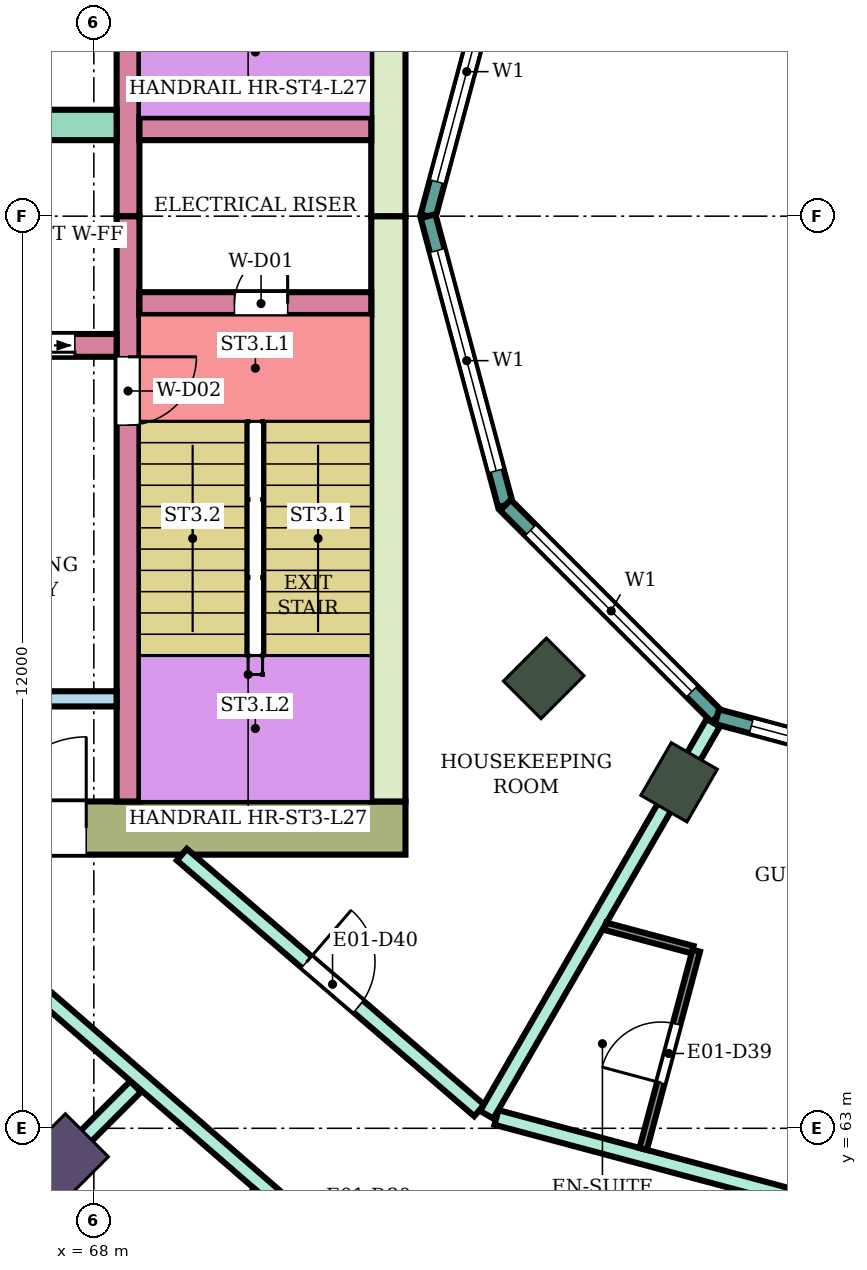
"""IFC4 building model, lengths in metres.
Left out: names, types, materials, properties, quantities, classifications, styles, units other than length and angle.
Written with IfcOpenShell. Run it as: python <this file> out.ifc"""

import sys

from ifc_helpers import new_model, si_unit, direction, frame, frame_2d, origin, origin_2d, place, context, subcontext, project, spatial, rectangle, extrude, element, fill, save


model = new_model("IFC4")
c1 = context("Model", 3, precision=1e-05, world=origin(), true_north=direction((0.0, 1.0)))
c2 = subcontext(c1, "Body", "Model", "MODEL_VIEW")
j1 = project(units=[si_unit("LENGTHUNIT", "METRE"), si_unit("PLANEANGLEUNIT", "RADIAN")], contexts=[c1])
p1 = place(None, origin())
s1 = spatial("IfcSite", under=j1, at=p1, CompositionType="ELEMENT")
p2 = place(p1, origin())
s2 = spatial("IfcBuilding", under=s1, at=p2, CompositionType="ELEMENT")
p3 = place(p2, frame((0.0, 0.0, 118.5)))
s3 = spatial("IfcBuildingStorey", under=s2, at=p3, CompositionType="ELEMENT", Elevation=118.5)
p4 = place(p3, frame((67.555, 62.555, 0.0), z_axis=(0.0, 0.0, 1.0), x_axis=(-0.707106781187, -0.707106781187, 0.0)))
e1 = element("IfcColumn", 1, at=p4, inside=s3, PredefinedType="COLUMN", context=c2, shape_type="SweptSolid", body=[
    extrude(rectangle(XDim=1.0, YDim=0.8, at=origin_2d()), origin(), (0.0, 0.0, 1.0), 3.9),
])
for number, where, z_axis, x_axis in (
    (2, (73.919, 68.919, 0.0), (0.0, 0.0, 1.0), (-0.707, -0.707, 0.0)),
    (3, (75.7, 67.552, 0.0), (0.0, 0.0, 1.0), (-0.5, -0.866, 0.0)),
):
    element("IfcColumn", number, at=place(p3, frame(where, z_axis=z_axis, x_axis=x_axis)), inside=s3, PredefinedType="COLUMN", context=c2, shape_type="SweptSolid", body=[
        extrude(rectangle(XDim=0.8, YDim=0.7, at=origin_2d()), origin(), (0.0, 0.0, 1.0), 3.9),
    ])
p5 = place(p3, frame((72.1, 66.95, 0.0), z_axis=(0.0, 0.0, 1.0), x_axis=(-1.0, 0.0, 0.0)))
e4 = element("IfcWall", 4, at=p5, inside=s3, PredefinedType="SHEAR", context=c2, shape_type="SweptSolid", body=[
    extrude(rectangle(XDim=14.8, YDim=0.7, at=frame_2d((7.4, 0.0))), origin(), (0.0, 0.0, 1.0), 3.58),
])
p6 = place(p5, frame((4.2, 0.0, 0.0)))
e5 = element("IfcOpeningElement", 5, at=p6, cuts=e4, PredefinedType="OPENING", context=c2, shape_type="SweptSolid", body=[
    extrude(rectangle(XDim=2.4, YDim=2.4, at=frame_2d((1.2, 1.2))), frame((0.0, 0.36, 0.0), z_axis=(0.0, -1.0, 0.0), x_axis=(1.0, 0.0, 0.0)), (0.0, 0.0, 1.0), 0.72),
])
for number, where, z_axis, x_axis in (
    (6, (71.875, 75.0, 0.0), (0.0, 0.0, 1.0), (0.0, -1.0, 0.0)),
    (7, (71.875, 82.7, 0.0), (0.0, 0.0, 1.0), (0.0, -1.0, 0.0)),
):
    element("IfcWall", number, at=place(p3, frame(where, z_axis=z_axis, x_axis=x_axis)), inside=s3, PredefinedType="SHEAR", context=c2, shape_type="SweptSolid", body=[
        extrude(rectangle(XDim=7.7, YDim=0.45, at=frame_2d((3.85, 0.0))), origin(), (0.0, 0.0, 1.0), 3.58),
    ])
p7 = place(p3, frame((68.45, 75.0, 0.0), z_axis=(0.0, 0.0, 1.0), x_axis=(0.0, -1.0, 0.0)))
e8 = element("IfcWall", 8, at=p7, inside=s3, PredefinedType="SHEAR", context=c2, shape_type="SweptSolid", body=[
    extrude(rectangle(XDim=7.7, YDim=0.3, at=frame_2d((3.85, 0.0))), origin(), (0.0, 0.0, 1.0), 3.58),
])
p8 = place(p7, frame((1.85, 0.0, 0.0)))
e9 = element("IfcOpeningElement", 9, at=p8, cuts=e8, PredefinedType="OPENING", context=c2, shape_type="SweptSolid", body=[
    extrude(rectangle(XDim=0.9, YDim=2.1, at=frame_2d((0.45, 1.05))), frame((0.0, 0.16, 0.0), z_axis=(0.0, -1.0, 0.0), x_axis=(1.0, 0.0, 0.0)), (0.0, 0.0, 1.0), 0.32),
])
p9 = place(p3, frame((68.45, 82.7, 0.0), z_axis=(0.0, 0.0, 1.0), x_axis=(0.0, -1.0, 0.0)))
e10 = element("IfcWall", 10, at=p9, inside=s3, PredefinedType="SHEAR", context=c2, shape_type="SweptSolid", body=[
    extrude(rectangle(XDim=7.7, YDim=0.3, at=frame_2d((3.85, 0.0))), origin(), (0.0, 0.0, 1.0), 3.58),
])
p10 = place(p9, frame((0.35, 0.0, 0.0)))
e11 = element("IfcOpeningElement", 11, at=p10, cuts=e10, PredefinedType="OPENING", context=c2, shape_type="SweptSolid", body=[
    extrude(rectangle(XDim=0.9, YDim=2.1, at=frame_2d((0.45, 1.05))), frame((0.0, 0.16, 0.0), z_axis=(0.0, -1.0, 0.0), x_axis=(1.0, 0.0, 0.0)), (0.0, 0.0, 1.0), 0.32),
])
p11 = place(p3, frame((71.65, 73.85, 0.0), z_axis=(0.0, 0.0, 1.0), x_axis=(-1.0, 0.0, 0.0)))
e12 = element("IfcWall", 12, at=p11, inside=s3, PredefinedType="SHEAR", context=c2, shape_type="SweptSolid", body=[
    extrude(rectangle(XDim=3.05, YDim=0.3, at=frame_2d((1.525, 0.0))), origin(), (0.0, 0.0, 1.0), 3.58),
])
p12 = place(p11, frame((1.1, 0.0, 0.0)))
e13 = element("IfcOpeningElement", 13, at=p12, cuts=e12, PredefinedType="OPENING", context=c2, shape_type="SweptSolid", body=[
    extrude(rectangle(XDim=0.7, YDim=2.0, at=frame_2d((0.35, 1.0))), frame((0.0, 0.16, 0.0), z_axis=(0.0, -1.0, 0.0), x_axis=(1.0, 0.0, 0.0)), (0.0, 0.0, 1.0), 0.32),
])
p13 = place(p3, frame((71.65, 76.15, 0.0), z_axis=(0.0, 0.0, 1.0), x_axis=(-1.0, 0.0, 0.0)))
e14 = element("IfcWall", 14, at=p13, inside=s3, PredefinedType="SHEAR", context=c2, shape_type="SweptSolid", body=[
    extrude(rectangle(XDim=3.05, YDim=0.3, at=frame_2d((1.525, 0.0))), origin(), (0.0, 0.0, 1.0), 3.58),
])
p14 = place(p3, frame((68.3, 73.3, 0.0), z_axis=(0.0, 0.0, 1.0), x_axis=(-1.0, 0.0, 0.0)))
e15 = element("IfcWall", 15, at=p14, inside=s3, PredefinedType="SHEAR", context=c2, shape_type="SweptSolid", body=[
    extrude(rectangle(XDim=11.0, YDim=0.3, at=frame_2d((5.5, 0.0))), origin(), (0.0, 0.0, 1.0), 3.58),
])
p15 = place(p14, frame((0.55, 0.0, 0.0)))
e16 = element("IfcOpeningElement", 16, at=p15, cuts=e15, PredefinedType="OPENING", context=c2, shape_type="SweptSolid", body=[
    extrude(rectangle(XDim=1.1, YDim=2.1, at=frame_2d((0.55, 1.05))), frame((0.0, 0.16, 0.0), z_axis=(0.0, -1.0, 0.0), x_axis=(1.0, 0.0, 0.0)), (0.0, 0.0, 1.0), 0.32),
])
p16 = place(p14, frame((8.1, 0.0, 0.0)))
e17 = element("IfcOpeningElement", 17, at=p16, cuts=e15, PredefinedType="OPENING", context=c2, shape_type="SweptSolid", body=[
    extrude(rectangle(XDim=1.0, YDim=2.1, at=frame_2d((0.5, 1.05))), frame((0.0, 0.16, 0.0), z_axis=(0.0, -1.0, 0.0), x_axis=(1.0, 0.0, 0.0)), (0.0, 0.0, 1.0), 0.32),
])
p17 = place(p3, frame((68.3, 76.2, 0.0), z_axis=(0.0, 0.0, 1.0), x_axis=(-1.0, 0.0, 0.0)))
e18 = element("IfcWall", 18, at=p17, inside=s3, PredefinedType="SHEAR", context=c2, shape_type="SweptSolid", body=[
    extrude(rectangle(XDim=11.0, YDim=0.4, at=frame_2d((5.5, 0.0))), origin(), (0.0, 0.0, 1.0), 3.58),
])
p18 = place(p3, frame((68.3, 68.65, 0.0), z_axis=(0.0, 0.0, 1.0), x_axis=(-1.0, 0.0, 0.0)))
e19 = element("IfcWall", 19, at=p18, inside=s3, PredefinedType="SHEAR", context=c2, shape_type="SweptSolid", body=[
    extrude(rectangle(XDim=4.5, YDim=0.2, at=frame_2d((2.25, 0.0))), origin(), (0.0, 0.0, 1.0), 3.58),
])
p19 = place(p3, frame((73.415, 78.802, 0.0), z_axis=(0.0, 0.0, 1.0), x_axis=(-0.258789828301, -0.965933654434, 0.0)))
e20 = element("IfcWall", 20, at=p19, inside=s3, PredefinedType="NOTDEFINED", context=c2, shape_type="SweptSolid", body=[
    extrude(rectangle(XDim=3.936, YDim=0.2, at=frame_2d((1.968, 0.0))), origin(), (0.0, 0.0, 1.0), 3.9),
])
p20 = place(p19, frame((0.468, 0.0, 0.9)))
e21 = element("IfcOpeningElement", 21, at=p20, cuts=e20, PredefinedType="OPENING", context=c2, shape_type="SweptSolid", body=[
    extrude(rectangle(XDim=3.0, YDim=2.3, at=frame_2d((1.5, 1.15))), frame((0.0, 0.11, 0.0), z_axis=(0.0, -1.0, 0.0), x_axis=(1.0, 0.0, 0.0)), (0.0, 0.0, 1.0), 0.22),
])
p21 = place(p3, frame((72.396, 75.0, 0.0), z_axis=(0.0, 0.0, 1.0), x_axis=(0.258789828301, -0.965933654434, 0.0)))
e22 = element("IfcWall", 22, at=p21, inside=s3, PredefinedType="NOTDEFINED", context=c2, shape_type="SweptSolid", body=[
    extrude(rectangle(XDim=3.936, YDim=0.2, at=frame_2d((1.968, 0.0))), origin(), (0.0, 0.0, 1.0), 3.9),
])
p22 = place(p21, frame((0.468, 0.0, 0.9)))
e23 = element("IfcOpeningElement", 23, at=p22, cuts=e22, PredefinedType="OPENING", context=c2, shape_type="SweptSolid", body=[
    extrude(rectangle(XDim=3.0, YDim=2.3, at=frame_2d((1.5, 1.15))), frame((0.0, 0.11, 0.0), z_axis=(0.0, -1.0, 0.0), x_axis=(1.0, 0.0, 0.0)), (0.0, 0.0, 1.0), 0.22),
])
p23 = place(p3, frame((73.415, 71.198, 0.0), z_axis=(0.0, 0.0, 1.0), x_axis=(0.707106781187, -0.707106781187, 0.0)))
e24 = element("IfcWall", 24, at=p23, inside=s3, PredefinedType="NOTDEFINED", context=c2, shape_type="SweptSolid", body=[
    extrude(rectangle(XDim=3.936, YDim=0.2, at=frame_2d((1.968, 0.0))), origin(), (0.0, 0.0, 1.0), 3.9),
])
p24 = place(p23, frame((0.468, 0.0, 0.9)))
e25 = element("IfcOpeningElement", 25, at=p24, cuts=e24, PredefinedType="OPENING", context=c2, shape_type="SweptSolid", body=[
    extrude(rectangle(XDim=3.0, YDim=2.3, at=frame_2d((1.5, 1.15))), frame((0.0, 0.11, 0.0), z_axis=(0.0, -1.0, 0.0), x_axis=(1.0, 0.0, 0.0)), (0.0, 0.0, 1.0), 0.22),
])
p25 = place(p3, frame((76.198, 68.415, 0.0), z_axis=(0.0, 0.0, 1.0), x_axis=(0.965933654434, -0.258789828301, 0.0)))
e26 = element("IfcWall", 26, at=p25, inside=s3, PredefinedType="NOTDEFINED", context=c2, shape_type="SweptSolid", body=[
    extrude(rectangle(XDim=3.936, YDim=0.2, at=frame_2d((1.968, 0.0))), origin(), (0.0, 0.0, 1.0), 3.9),
])
p26 = place(p25, frame((0.468, 0.0, 0.9)))
e27 = element("IfcOpeningElement", 27, at=p26, cuts=e26, PredefinedType="OPENING", context=c2, shape_type="SweptSolid", body=[
    extrude(rectangle(XDim=3.0, YDim=2.3, at=frame_2d((1.5, 1.15))), frame((0.0, 0.11, 0.0), z_axis=(0.0, -1.0, 0.0), x_axis=(1.0, 0.0, 0.0)), (0.0, 0.0, 1.0), 0.22),
])
p27 = place(p3, frame((63.596, 58.596, 0.0), z_axis=(0.0, 0.0, 1.0), x_axis=(0.707106781187, 0.707106781187, 0.0)))
e28 = element("IfcWall", 28, at=p27, inside=s3, PredefinedType="PARTITIONING", context=c2, shape_type="SweptSolid", body=[
    extrude(rectangle(XDim=7.005, YDim=0.2, at=frame_2d((3.503, 0.0))), origin(), (0.0, 0.0, 1.0), 3.45),
])
p28 = place(p3, frame((67.081, 64.971, 0.0), z_axis=(0.0, 0.0, 1.0), x_axis=(0.755031061605, -0.65568902386, 0.0)))
e29 = element("IfcWall", 29, at=p28, inside=s3, PredefinedType="PARTITIONING", context=c2, shape_type="SweptSolid", body=[
    extrude(rectangle(XDim=6.186, YDim=0.2, at=frame_2d((3.093, 0.0))), origin(), (0.0, 0.0, 1.0), 3.45),
])
p29 = place(p28, frame((4.755, 0.0, 0.0)))
e30 = element("IfcOpeningElement", 30, at=p29, cuts=e29, PredefinedType="OPENING", context=c2, shape_type="SweptSolid", body=[
    extrude(rectangle(XDim=1.0, YDim=2.1, at=frame_2d((0.5, 1.05))), frame((0.0, 0.11, 0.0), z_axis=(0.0, -1.0, 0.0), x_axis=(1.0, 0.0, 0.0)), (0.0, 0.0, 1.0), 0.22),
])
p30 = place(p3, frame((69.158, 66.6, 0.0), z_axis=(0.0, 0.0, 1.0), x_axis=(0.758063092745, -0.652181222835, 0.0)))
e31 = element("IfcWall", 31, at=p30, inside=s3, PredefinedType="PARTITIONING", context=c2, shape_type="SweptSolid", body=[
    extrude(rectangle(XDim=5.16, YDim=0.2, at=frame_2d((2.58, 0.0))), origin(), (0.0, 0.0, 1.0), 3.45),
])
p31 = place(p30, frame((2.165, 0.0, 0.0)))
e32 = element("IfcOpeningElement", 32, at=p31, cuts=e31, PredefinedType="OPENING", context=c2, shape_type="SweptSolid", body=[
    extrude(rectangle(XDim=0.9, YDim=2.1, at=frame_2d((0.45, 1.05))), frame((0.0, 0.11, 0.0), z_axis=(0.0, -1.0, 0.0), x_axis=(1.0, 0.0, 0.0)), (0.0, 0.0, 1.0), 0.22),
])
p32 = place(p3, frame((73.297, 63.143, 0.0), z_axis=(0.0, 0.0, 1.0), x_axis=(0.965859030528, -0.25906820173, 0.0)))
e33 = element("IfcWall", 33, at=p32, inside=s3, PredefinedType="PARTITIONING", context=c2, shape_type="SweptSolid", body=[
    extrude(rectangle(XDim=6.81, YDim=0.2, at=frame_2d((3.405, 0.0))), origin(), (0.0, 0.0, 1.0), 3.45),
])
p33 = place(p32, frame((5.39, 0.0, 0.0)))
e34 = element("IfcOpeningElement", 34, at=p33, cuts=e33, PredefinedType="OPENING", context=c2, shape_type="SweptSolid", body=[
    extrude(rectangle(XDim=1.0, YDim=2.1, at=frame_2d((0.5, 1.05))), frame((0.0, 0.11, 0.0), z_axis=(0.0, -1.0, 0.0), x_axis=(1.0, 0.0, 0.0)), (0.0, 0.0, 1.0), 0.22),
])
p34 = place(p3, frame((73.169, 63.178, 0.0), z_axis=(0.0, 0.0, 1.0), x_axis=(0.500239348149, 0.865887171959, 0.0)))
e35 = element("IfcWall", 35, at=p34, inside=s3, PredefinedType="PARTITIONING", context=c2, shape_type="SweptSolid", body=[
    extrude(rectangle(XDim=5.955, YDim=0.2, at=frame_2d((2.978, 0.0))), origin(), (0.0, 0.0, 1.0), 3.45),
])
p35 = place(p3, frame((65.209, 62.875, 0.0), z_axis=(0.0, 0.0, 1.0), x_axis=(0.757930378138, -0.652335451969, 0.0)))
e36 = element("IfcWall", 36, at=p35, inside=s3, PredefinedType="PARTITIONING", context=c2, shape_type="SweptSolid", body=[
    extrude(rectangle(XDim=4.15, YDim=0.1, at=frame_2d((2.075, 0.0))), origin(), (0.0, 0.0, 1.0), 3.45),
])
p36 = place(p3, frame((68.393, 60.135, 0.0), z_axis=(0.0, 0.0, 1.0), x_axis=(0.652061182569, 0.758166349944, 0.0)))
e37 = element("IfcWall", 37, at=p36, inside=s3, PredefinedType="PARTITIONING", context=c2, shape_type="SweptSolid", body=[
    extrude(rectangle(XDim=2.69, YDim=0.1, at=frame_2d((1.345, 0.0))), origin(), (0.0, 0.0, 1.0), 3.45),
])
p37 = place(p36, frame((1.0, 0.0, 0.0)))
e38 = element("IfcOpeningElement", 38, at=p37, cuts=e37, PredefinedType="OPENING", context=c2, shape_type="SweptSolid", body=[
    extrude(rectangle(XDim=0.8, YDim=2.1, at=frame_2d((0.4, 1.05))), frame((0.0, 0.06, 0.0), z_axis=(0.0, -1.0, 0.0), x_axis=(1.0, 0.0, 0.0)), (0.0, 0.0, 1.0), 0.12),
])
p38 = place(p3, frame((74.729, 65.657, 0.0), z_axis=(0.0, 0.0, 1.0), x_axis=(0.965948051503, -0.258736085224, 0.0)))
e39 = element("IfcWall", 39, at=p38, inside=s3, PredefinedType="PARTITIONING", context=c2, shape_type="SweptSolid", body=[
    extrude(rectangle(XDim=1.189, YDim=0.1, at=frame_2d((0.594, 0.0))), origin(), (0.0, 0.0, 1.0), 3.45),
])
p39 = place(p3, frame((75.227, 62.729, 0.0), z_axis=(0.0, 0.0, 1.0), x_axis=(0.258945475746, 0.965891940432, 0.0)))
e40 = element("IfcWall", 40, at=p39, inside=s3, PredefinedType="PARTITIONING", context=c2, shape_type="SweptSolid", body=[
    extrude(rectangle(XDim=2.7, YDim=0.1, at=frame_2d((1.35, 0.0))), origin(), (0.0, 0.0, 1.0), 3.45),
])
p40 = place(p39, frame((0.9, 0.0, 0.0)))
e41 = element("IfcOpeningElement", 41, at=p40, cuts=e40, PredefinedType="OPENING", context=c2, shape_type="SweptSolid", body=[
    extrude(rectangle(XDim=0.8, YDim=2.1, at=frame_2d((0.4, 1.05))), frame((0.0, 0.06, 0.0), z_axis=(0.0, -1.0, 0.0), x_axis=(1.0, 0.0, 0.0)), (0.0, 0.0, 1.0), 0.12),
])
p41 = place(p20, origin())
e42 = element("IfcWindow", 42, at=p41, inside=s3, PartitioningType="SINGLE_PANEL", PredefinedType="WINDOW", context=c2, shape_type="SweptSolid", body=[
    extrude(rectangle(XDim=3.0, YDim=2.3, at=frame_2d((1.5, 1.15))), frame((0.0, 0.03, 0.0), z_axis=(0.0, -1.0, 0.0), x_axis=(1.0, 0.0, 0.0)), (0.0, 0.0, 1.0), 0.06),
])
fill(e21, e42)
p42 = place(p22, origin())
e43 = element("IfcWindow", 43, at=p42, inside=s3, PartitioningType="SINGLE_PANEL", PredefinedType="WINDOW", context=c2, shape_type="SweptSolid", body=[
    extrude(rectangle(XDim=3.0, YDim=2.3, at=frame_2d((1.5, 1.15))), frame((0.0, 0.03, 0.0), z_axis=(0.0, -1.0, 0.0), x_axis=(1.0, 0.0, 0.0)), (0.0, 0.0, 1.0), 0.06),
])
fill(e23, e43)
p43 = place(p24, origin())
e44 = element("IfcWindow", 44, at=p43, inside=s3, PartitioningType="SINGLE_PANEL", PredefinedType="WINDOW", context=c2, shape_type="SweptSolid", body=[
    extrude(rectangle(XDim=3.0, YDim=2.3, at=frame_2d((1.5, 1.15))), frame((0.0, 0.03, 0.0), z_axis=(0.0, -1.0, 0.0), x_axis=(1.0, 0.0, 0.0)), (0.0, 0.0, 1.0), 0.06),
])
fill(e25, e44)
p44 = place(p26, origin())
e45 = element("IfcWindow", 45, at=p44, inside=s3, PartitioningType="SINGLE_PANEL", PredefinedType="WINDOW", context=c2, shape_type="SweptSolid", body=[
    extrude(rectangle(XDim=3.0, YDim=2.3, at=frame_2d((1.5, 1.15))), frame((0.0, 0.03, 0.0), z_axis=(0.0, -1.0, 0.0), x_axis=(1.0, 0.0, 0.0)), (0.0, 0.0, 1.0), 0.06),
])
fill(e27, e45)
p45 = place(p40, origin())
e46 = element("IfcDoor", 46, at=p45, inside=s3, OperationType="SINGLE_SWING_LEFT", PredefinedType="DOOR", context=c2, shape_type="SweptSolid", body=[
    extrude(rectangle(XDim=0.8, YDim=2.1, at=frame_2d((0.4, 1.05))), frame((0.0, 0.025, 0.0), z_axis=(0.0, -1.0, 0.0), x_axis=(1.0, 0.0, 0.0)), (0.0, 0.0, 1.0), 0.05),
])
fill(e41, e46)
p46 = place(p31, origin())
e47 = element("IfcDoor", 47, at=p46, inside=s3, OperationType="SINGLE_SWING_LEFT", PredefinedType="DOOR", context=c2, shape_type="SweptSolid", body=[
    extrude(rectangle(XDim=0.9, YDim=2.1, at=frame_2d((0.45, 1.05))), frame((0.0, 0.025, 0.0), z_axis=(0.0, -1.0, 0.0), x_axis=(1.0, 0.0, 0.0)), (0.0, 0.0, 1.0), 0.05),
])
fill(e32, e47)
p47 = place(p12, frame((0.7, 0.0, 0.0), z_axis=(0.0, 0.0, 1.0), x_axis=(-1.0, 0.0, 0.0)))
e48 = element("IfcDoor", 48, at=p47, inside=s3, OperationType="SINGLE_SWING_RIGHT", PredefinedType="DOOR", context=c2, shape_type="SweptSolid", body=[
    extrude(rectangle(XDim=0.7, YDim=2.0, at=frame_2d((0.35, 1.0))), frame((0.0, 0.025, 0.0), z_axis=(0.0, -1.0, 0.0), x_axis=(1.0, 0.0, 0.0)), (0.0, 0.0, 1.0), 0.05),
])
fill(e13, e48)
p48 = place(p8, origin())
e49 = element("IfcDoor", 49, at=p48, inside=s3, OperationType="SINGLE_SWING_LEFT", PredefinedType="DOOR", context=c2, shape_type="SweptSolid", body=[
    extrude(rectangle(XDim=0.9, YDim=2.1, at=frame_2d((0.45, 1.05))), frame((0.0, 0.025, 0.0), z_axis=(0.0, -1.0, 0.0), x_axis=(1.0, 0.0, 0.0)), (0.0, 0.0, 1.0), 0.05),
])
fill(e9, e49)
p49 = place(p15, origin())
e50 = element("IfcDoor", 50, at=p49, inside=s3, OperationType="DOUBLE_DOOR_SLIDING", PredefinedType="DOOR", context=c2, shape_type="SweptSolid", body=[
    extrude(rectangle(XDim=1.1, YDim=2.1, at=frame_2d((0.55, 1.05))), frame((0.0, 0.025, 0.0), z_axis=(0.0, -1.0, 0.0), x_axis=(1.0, 0.0, 0.0)), (0.0, 0.0, 1.0), 0.05),
])
fill(e16, e50)
p50 = place(p6, frame((2.4, 0.0, 0.0), z_axis=(0.0, 0.0, 1.0), x_axis=(-1.0, 0.0, 0.0)))
e51 = element("IfcDoor", 51, at=p50, inside=s3, OperationType="DOUBLE_DOOR_SINGLE_SWING", PredefinedType="DOOR", context=c2, shape_type="SweptSolid", body=[
    extrude(rectangle(XDim=2.4, YDim=2.4, at=frame_2d((1.2, 1.2))), frame((0.0, 0.025, 0.0), z_axis=(0.0, -1.0, 0.0), x_axis=(1.0, 0.0, 0.0)), (0.0, 0.0, 1.0), 0.05),
])
fill(e5, e51)
save(model, sys.argv[1])
